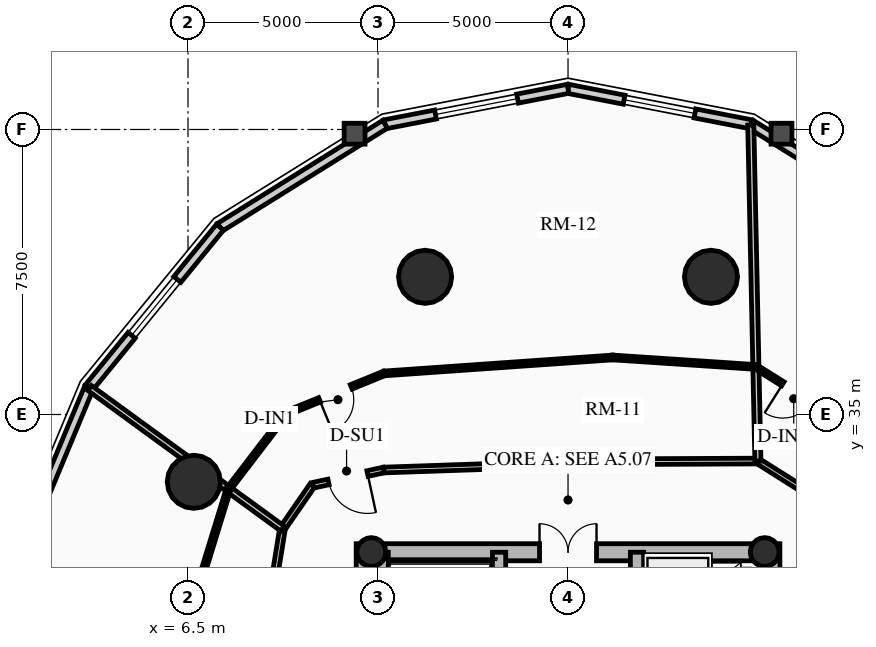
"""IFC4 building model, lengths in metres.
Left out: names, types, materials, properties, quantities, classifications, styles, units other than length and angle.
Written with IfcOpenShell. Run it as: python <this file> out.ifc"""

import sys

from ifc_helpers import new_model, si_unit, direction, frame, frame_2d, origin, origin_2d, place, context, subcontext, project, spatial, rectangle, circle, hollow_circle, extrude, source, transform, mapped, element, fill, save


model = new_model("IFC4")
c1 = context("Model", 3, precision=1e-05, world=origin(), true_north=direction((0.0, 1.0)))
c2 = subcontext(c1, "Body", "Model", "MODEL_VIEW")
j1 = project(units=[si_unit("LENGTHUNIT", "METRE"), si_unit("PLANEANGLEUNIT", "RADIAN")], contexts=[c1])
p1 = place(None, origin())
s1 = spatial("IfcSite", under=j1, at=p1, CompositionType="ELEMENT")
p2 = place(p1, origin())
s2 = spatial("IfcBuilding", under=s1, at=p2, CompositionType="ELEMENT")
p3 = place(p2, frame((0.0, 0.0, 90.52)))
s3 = spatial("IfcBuildingStorey", under=s2, at=p3, CompositionType="ELEMENT", Elevation=90.52)
for number, where, z_axis, x_axis in (
    (1, (11.15, 17.4, 0.0), (0.0, 0.0, 1.0), (0.0, 1.0, 0.0)),
    (2, (21.85, 17.4, 0.0), (0.0, 0.0, 1.0), (0.0, 1.0, 0.0)),
):
    element("IfcWall", number, at=place(p3, frame(where, z_axis=z_axis, x_axis=x_axis)), inside=s3, PredefinedType="SHEAR", context=c2, shape_type="SweptSolid", body=[
        extrude(rectangle(XDim=14.2, YDim=0.45, at=frame_2d((7.1, 0.0))), origin(), (0.0, 0.0, 1.0), 2.91),
    ])
p4 = place(p3, frame((11.15, 31.375, 0.0), z_axis=(0.0, 0.0, 1.0), x_axis=(1.0, 0.0, 0.0)))
e3 = element("IfcWall", 3, at=p4, inside=s3, PredefinedType="SHEAR", context=c2, shape_type="SweptSolid", body=[
    extrude(rectangle(XDim=10.7, YDim=0.45, at=frame_2d((5.35, 0.0))), origin(), (0.0, 0.0, 1.0), 2.91),
])
m1 = source(origin(), c2, "Body", "SweptSolid", [
    extrude(rectangle(XDim=1.5, YDim=2.02, at=frame_2d((0.75, 1.01))), frame((0.0, 0.235, 0.0), z_axis=(0.0, -1.0, 0.0), x_axis=(1.0, 0.0, 0.0)), (0.0, 0.0, 1.0), 0.47),
])
p5 = place(p4, frame((4.6, 0.0, 0.0)))
e4 = element("IfcOpeningElement", 4, at=p5, cuts=e3, PredefinedType="OPENING", context=c2, shape_type="MappedRepresentation", body=[
    mapped(m1, transform((0.0, 0.0, 0.0), x_axis=(1.0, 0.0, 0.0), y_axis=(0.0, 1.0, 0.0), z_axis=(0.0, 0.0, 1.0), scale=1.0)),
])
p6 = place(p3, frame((14.685, 17.625, 0.0), z_axis=(0.0, 0.0, 1.0), x_axis=(0.0, 1.0, 0.0)))
e5 = element("IfcWall", 5, at=p6, inside=s3, PredefinedType="SHEAR", context=c2, shape_type="SweptSolid", body=[
    extrude(rectangle(XDim=13.75, YDim=0.35, at=frame_2d((6.875, 0.0))), origin(), (0.0, 0.0, 1.0), 2.91),
])
m2 = source(origin(), c2, "Body", "SweptSolid", [
    extrude(rectangle(XDim=1.1, YDim=2.015, at=frame_2d((0.55, 1.007))), frame((0.0, 0.185, 0.0), z_axis=(0.0, -1.0, 0.0), x_axis=(1.0, 0.0, 0.0)), (0.0, 0.0, 1.0), 0.37),
])
p7 = place(p6, frame((4.875, 0.0, 0.0)))
e6 = element("IfcOpeningElement", 6, at=p7, cuts=e5, PredefinedType="OPENING", context=c2, shape_type="MappedRepresentation", body=[
    mapped(m2, transform((0.0, 0.0, 0.0), x_axis=(1.0, 0.0, 0.0), y_axis=(0.0, 1.0, 0.0), z_axis=(0.0, 0.0, 1.0), scale=1.0)),
])
m3 = source(origin(), c2, "Body", "SweptSolid", [
    extrude(rectangle(XDim=1.15, YDim=2.02, at=frame_2d((0.575, 1.01))), frame((0.0, 0.185, 0.0), z_axis=(0.0, -1.0, 0.0), x_axis=(1.0, 0.0, 0.0)), (0.0, 0.0, 1.0), 0.37),
])
p8 = place(p6, frame((7.295, 0.0, 0.0)))
e7 = element("IfcOpeningElement", 7, at=p8, cuts=e5, PredefinedType="OPENING", context=c2, shape_type="MappedRepresentation", body=[
    mapped(m3, transform((0.0, 0.0, 0.0), x_axis=(1.0, 0.0, 0.0), y_axis=(0.0, 1.0, 0.0), z_axis=(0.0, 0.0, 1.0), scale=1.0)),
])
p9 = place(p3, frame((18.315, 17.625, 0.0), z_axis=(0.0, 0.0, 1.0), x_axis=(0.0, 1.0, 0.0)))
e8 = element("IfcWall", 8, at=p9, inside=s3, PredefinedType="SHEAR", context=c2, shape_type="SweptSolid", body=[
    extrude(rectangle(XDim=13.75, YDim=0.35, at=frame_2d((6.875, 0.0))), origin(), (0.0, 0.0, 1.0), 2.91),
])
p10 = place(p9, frame((10.0, 0.0, 0.0)))
e9 = element("IfcOpeningElement", 9, at=p10, cuts=e8, PredefinedType="OPENING", context=c2, shape_type="MappedRepresentation", body=[
    mapped(m2, transform((0.0, 0.0, 0.0), x_axis=(1.0, 0.0, 0.0), y_axis=(0.0, 1.0, 0.0), z_axis=(0.0, 0.0, 1.0), scale=1.0)),
])
p11 = place(p9, frame((12.0, 0.0, 0.0)))
e10 = element("IfcOpeningElement", 10, at=p11, cuts=e8, PredefinedType="OPENING", context=c2, shape_type="MappedRepresentation", body=[
    mapped(m2, transform((0.0, 0.0, 0.0), x_axis=(1.0, 0.0, 0.0), y_axis=(0.0, 1.0, 0.0), z_axis=(0.0, 0.0, 1.0), scale=1.0)),
])
p12 = place(p9, frame((5.305, 0.0, 0.0)))
e11 = element("IfcOpeningElement", 11, at=p12, cuts=e8, PredefinedType="OPENING", context=c2, shape_type="MappedRepresentation", body=[
    mapped(m3, transform((0.0, 0.0, 0.0), x_axis=(1.0, 0.0, 0.0), y_axis=(0.0, 1.0, 0.0), z_axis=(0.0, 0.0, 1.0), scale=1.0)),
])
p13 = place(p3, frame((11.595, 24.655, 0.0), z_axis=(0.0, 0.0, 1.0), x_axis=(0.0, 1.0, 0.0)))
e12 = element("IfcWall", 12, at=p13, inside=s3, PredefinedType="SHEAR", context=c2, shape_type="SweptSolid", body=[
    extrude(rectangle(XDim=6.72, YDim=0.35, at=frame_2d((3.36, 0.0))), origin(), (0.0, 0.0, 1.0), 2.91),
])
for number, where, z_axis, x_axis in (
    (13, (11.325, 31.38, 0.0), (0.0, 0.0, 1.0), (1.0, 0.0, 0.0)),
    (14, (21.675, 31.38, 0.0), (0.0, 0.0, 1.0), (1.0, 0.0, 0.0)),
):
    element("IfcColumn", number, at=place(p3, frame(where, z_axis=z_axis, x_axis=x_axis)), inside=s3, PredefinedType="COLUMN", context=c2, shape_type="SweptSolid", body=[
        extrude(hollow_circle(Radius=0.38, WallThickness=0.032, at=origin_2d()), origin(), (0.0, 0.0, 1.0), 2.91),
    ])
for number, where, z_axis, x_axis in (
    (15, (20.261, 38.623, 0.0), (0.0, 0.0, 1.0), (1.0, 0.0, 0.0)),
    (16, (12.739, 38.623, 0.0), (0.0, 0.0, 1.0), (1.0, 0.0, 0.0)),
    (17, (6.653, 33.229, 0.0), (0.0, 0.0, 1.0), (1.0, 0.0, 0.0)),
):
    element("IfcColumn", number, at=place(p3, frame(where, z_axis=z_axis, x_axis=x_axis)), inside=s3, PredefinedType="USERDEFINED", context=c2, shape_type="SweptSolid", body=[
        extrude(circle(Radius=0.7, at=origin_2d()), origin(), (0.0, 0.0, 1.0), 2.91),
    ])
p14 = place(p3, frame((21.315, 42.637, 0.0), z_axis=(0.0, 0.0, 1.0), x_axis=(0.848520380187, -0.529162701263, 0.0)))
e18 = element("IfcWall", 18, at=p14, inside=s3, PredefinedType="SOLIDWALL", context=c2, shape_type="SweptSolid", body=[
    extrude(rectangle(XDim=5.119, YDim=0.24, at=frame_2d((2.56, 0.0))), origin(), (0.0, 0.0, 1.0), 2.179),
])
p15 = place(p3, frame((16.5, 43.57, 0.0), z_axis=(0.0, 0.0, 1.0), x_axis=(0.981723785992, -0.190311344954, 0.0)))
e19 = element("IfcWall", 19, at=p15, inside=s3, PredefinedType="SOLIDWALL", context=c2, shape_type="SweptSolid", body=[
    extrude(rectangle(XDim=4.904, YDim=0.24, at=frame_2d((2.452, 0.0))), origin(), (0.0, 0.0, 1.0), 2.179),
])
m4 = source(origin(), c2, "Body", "SweptSolid", [
    extrude(rectangle(XDim=1.9, YDim=1.35, at=frame_2d((0.95, 0.675))), frame((0.0, 0.13, 0.0), z_axis=(0.0, -1.0, 0.0), x_axis=(1.0, 0.0, 0.0)), (0.0, 0.0, 1.0), 0.26),
])
p16 = place(p15, frame((1.502, 0.0, 0.65)))
e20 = element("IfcOpeningElement", 20, at=p16, cuts=e19, PredefinedType="OPENING", context=c2, shape_type="MappedRepresentation", body=[
    mapped(m4, transform((0.0, 0.0, 0.0), x_axis=(1.0, 0.0, 0.0), y_axis=(0.0, 1.0, 0.0), z_axis=(0.0, 0.0, 1.0), scale=1.0)),
])
p17 = place(p3, frame((11.685, 42.637, 0.0), z_axis=(0.0, 0.0, 1.0), x_axis=(0.981723785992, 0.190311344954, 0.0)))
e21 = element("IfcWall", 21, at=p17, inside=s3, PredefinedType="SOLIDWALL", context=c2, shape_type="SweptSolid", body=[
    extrude(rectangle(XDim=4.904, YDim=0.24, at=frame_2d((2.452, 0.0))), origin(), (0.0, 0.0, 1.0), 2.179),
])
m5 = source(origin(), c2, "Body", "SweptSolid", [
    extrude(rectangle(XDim=2.2, YDim=1.35, at=frame_2d((1.1, 0.675))), frame((0.0, 0.13, 0.0), z_axis=(0.0, -1.0, 0.0), x_axis=(1.0, 0.0, 0.0)), (0.0, 0.0, 1.0), 0.26),
])
p18 = place(p17, frame((1.352, 0.0, 0.65)))
e22 = element("IfcOpeningElement", 22, at=p18, cuts=e21, PredefinedType="OPENING", context=c2, shape_type="MappedRepresentation", body=[
    mapped(m5, transform((0.0, 0.0, 0.0), x_axis=(1.0, 0.0, 0.0), y_axis=(0.0, 1.0, 0.0), z_axis=(0.0, 0.0, 1.0), scale=1.0)),
])
p19 = place(p3, frame((7.342, 39.928, 0.0), z_axis=(0.0, 0.0, 1.0), x_axis=(0.848520380187, 0.529162701263, 0.0)))
e23 = element("IfcWall", 23, at=p19, inside=s3, PredefinedType="SOLIDWALL", context=c2, shape_type="SweptSolid", body=[
    extrude(rectangle(XDim=5.119, YDim=0.24, at=frame_2d((2.56, 0.0))), origin(), (0.0, 0.0, 1.0), 2.179),
])
p20 = place(p3, frame((3.895, 35.709, 0.0), z_axis=(0.0, 0.0, 1.0), x_axis=(0.632700781152, 0.77439635945, 0.0)))
e24 = element("IfcWall", 24, at=p20, inside=s3, PredefinedType="SOLIDWALL", context=c2, shape_type="SweptSolid", body=[
    extrude(rectangle(XDim=5.448, YDim=0.24, at=frame_2d((2.724, 0.0))), origin(), (0.0, 0.0, 1.0), 2.179),
])
p21 = place(p20, frame((1.774, 0.0, 0.65)))
e25 = element("IfcOpeningElement", 25, at=p21, cuts=e24, PredefinedType="OPENING", context=c2, shape_type="MappedRepresentation", body=[
    mapped(m4, transform((0.0, 0.0, 0.0), x_axis=(1.0, 0.0, 0.0), y_axis=(0.0, 1.0, 0.0), z_axis=(0.0, 0.0, 1.0), scale=1.0)),
])
p22 = place(p3, frame((1.682, 30.393, 0.0), z_axis=(0.0, 0.0, 1.0), x_axis=(0.384344417632, 0.923189779317, 0.0)))
e26 = element("IfcWall", 26, at=p22, inside=s3, PredefinedType="SOLIDWALL", context=c2, shape_type="SweptSolid", body=[
    extrude(rectangle(XDim=5.758, YDim=0.24, at=frame_2d((2.879, 0.0))), origin(), (0.0, 0.0, 1.0), 2.179),
])
p23 = place(p3, frame((22.837, 32.929, 0.0), z_axis=(0.0, 0.0, 1.0), x_axis=(-0.84581079329, 0.533482991252, 0.0)))
e27 = element("IfcWall", 27, at=p23, inside=s3, PredefinedType="PARTITIONING", context=c2, shape_type="SweptSolid", body=[
    extrude(rectangle(XDim=1.585, YDim=0.15, at=frame_2d((0.792, 0.0))), origin(), (0.0, 0.0, 1.0), 2.225),
])
p24 = place(p3, frame((21.496, 33.775, 0.0), z_axis=(0.0, 0.0, 1.0), x_axis=(-0.999989544737, -0.004572790979, 0.0)))
e28 = element("IfcWall", 28, at=p24, inside=s3, PredefinedType="PARTITIONING", context=c2, shape_type="SweptSolid", body=[
    extrude(rectangle(XDim=3.364, YDim=0.15, at=frame_2d((1.682, 0.0))), origin(), (0.0, 0.0, 1.0), 2.225),
])
p25 = place(p3, frame((18.133, 33.76, 0.0), z_axis=(0.0, 0.0, 1.0), x_axis=(-0.999419643988, -0.034064280574, 0.0)))
e29 = element("IfcWall", 29, at=p25, inside=s3, PredefinedType="PARTITIONING", context=c2, shape_type="SweptSolid", body=[
    extrude(rectangle(XDim=6.486, YDim=0.15, at=frame_2d((3.243, 0.0))), origin(), (0.0, 0.0, 1.0), 2.225),
])
p26 = place(p3, frame((11.65, 33.539, 0.0), z_axis=(0.0, 0.0, 1.0), x_axis=(-0.977535921581, -0.210768882949, 0.0)))
e30 = element("IfcWall", 30, at=p26, inside=s3, PredefinedType="PARTITIONING", context=c2, shape_type="SweptSolid", body=[
    extrude(rectangle(XDim=1.923, YDim=0.15, at=frame_2d((0.961, 0.0))), origin(), (0.0, 0.0, 1.0), 2.225),
])
m6 = source(origin(), c2, "Body", "SweptSolid", [
    extrude(rectangle(XDim=1.05, YDim=2.015, at=frame_2d((0.525, 1.007))), frame((0.0, 0.085, 0.0), z_axis=(0.0, -1.0, 0.0), x_axis=(1.0, 0.0, 0.0)), (0.0, 0.0, 1.0), 0.17),
])
p27 = place(p26, frame((0.436, 0.0, 0.0)))
e31 = element("IfcOpeningElement", 31, at=p27, cuts=e30, PredefinedType="OPENING", context=c2, shape_type="MappedRepresentation", body=[
    mapped(m6, transform((0.0, 0.0, 0.0), x_axis=(1.0, 0.0, 0.0), y_axis=(0.0, 1.0, 0.0), z_axis=(0.0, 0.0, 1.0), scale=1.0)),
])
p28 = place(p3, frame((9.771, 33.133, 0.0), z_axis=(0.0, 0.0, 1.0), x_axis=(-0.568464531016, -0.822707771312, 0.0)))
e32 = element("IfcWall", 32, at=p28, inside=s3, PredefinedType="PARTITIONING", context=c2, shape_type="SweptSolid", body=[
    extrude(rectangle(XDim=1.38, YDim=0.15, at=frame_2d((0.69, 0.0))), origin(), (0.0, 0.0, 1.0), 2.225),
])
p29 = place(p3, frame((8.986, 31.998, 0.0), z_axis=(0.0, 0.0, 1.0), x_axis=(-0.158992972351, -0.98727971454, 0.0)))
e33 = element("IfcWall", 33, at=p29, inside=s3, PredefinedType="PARTITIONING", context=c2, shape_type="SweptSolid", body=[
    extrude(rectangle(XDim=1.539, YDim=0.15, at=frame_2d((0.769, 0.0))), origin(), (0.0, 0.0, 1.0), 2.225),
])
p30 = place(p3, frame((21.496, 33.775, 0.0), z_axis=(0.0, 0.0, 1.0), x_axis=(-0.021226580265, 0.999774690763, 0.0)))
e34 = element("IfcWall", 34, at=p30, inside=s3, PredefinedType="PARTITIONING", context=c2, shape_type="SweptSolid", body=[
    extrude(rectangle(XDim=8.845, YDim=0.16, at=frame_2d((4.422, 0.0))), origin(), (0.0, 0.0, 1.0), 2.179),
])
p31 = place(p3, frame((8.986, 31.998, 0.0), z_axis=(0.0, 0.0, 1.0), x_axis=(-0.808130498411, 0.589003478375, 0.0)))
e35 = element("IfcWall", 35, at=p31, inside=s3, PredefinedType="PARTITIONING", context=c2, shape_type="SweptSolid", body=[
    extrude(rectangle(XDim=6.281, YDim=0.16, at=frame_2d((3.14, 0.0))), origin(), (0.0, 0.0, 1.0), 2.179),
])
p32 = place(p3, frame((23.624, 34.884, 0.0), z_axis=(0.0, 0.0, 1.0), x_axis=(-0.84728326465, 0.531141289531, 0.0)))
e36 = element("IfcWall", 36, at=p32, inside=s3, PredefinedType="PARTITIONING", context=c2, shape_type="SweptSolid", body=[
    extrude(rectangle(XDim=2.573, YDim=0.125, at=frame_2d((1.287, 0.0))), origin(), (0.0, 0.0, 1.0), 2.225),
])
m7 = source(origin(), c2, "Body", "SweptSolid", [
    extrude(rectangle(XDim=0.9, YDim=2.005, at=frame_2d((0.45, 1.002))), frame((0.0, 0.073, 0.0), z_axis=(0.0, -1.0, 0.0), x_axis=(1.0, 0.0, 0.0)), (0.0, 0.0, 1.0), 0.145),
])
p33 = place(p32, frame((0.836, 0.0, 0.0)))
e37 = element("IfcOpeningElement", 37, at=p33, cuts=e36, PredefinedType="OPENING", context=c2, shape_type="MappedRepresentation", body=[
    mapped(m7, transform((0.0, 0.0, 0.0), x_axis=(1.0, 0.0, 0.0), y_axis=(0.0, 1.0, 0.0), z_axis=(0.0, 0.0, 1.0), scale=1.0)),
])
p34 = place(p3, frame((21.444, 36.251, 0.0), z_axis=(0.0, 0.0, 1.0), x_axis=(-0.997810544349, 0.066137112017, 0.0)))
e38 = element("IfcWall", 38, at=p34, inside=s3, PredefinedType="PARTITIONING", context=c2, shape_type="SweptSolid", body=[
    extrude(rectangle(XDim=3.776, YDim=0.125, at=frame_2d((1.888, 0.0))), origin(), (0.0, 0.0, 1.0), 2.225),
])
p35 = place(p3, frame((17.676, 36.501, 0.0), z_axis=(0.0, 0.0, 1.0), x_axis=(-0.997570913993, -0.069658248298, 0.0)))
e39 = element("IfcWall", 39, at=p35, inside=s3, PredefinedType="PARTITIONING", context=c2, shape_type="SweptSolid", body=[
    extrude(rectangle(XDim=6.028, YDim=0.125, at=frame_2d((3.014, 0.0))), origin(), (0.0, 0.0, 1.0), 2.225),
])
p36 = place(p3, frame((11.662, 36.081, 0.0), z_axis=(0.0, 0.0, 1.0), x_axis=(-0.925664670378, -0.378344972234, 0.0)))
e40 = element("IfcWall", 40, at=p36, inside=s3, PredefinedType="PARTITIONING", context=c2, shape_type="SweptSolid", body=[
    extrude(rectangle(XDim=2.774, YDim=0.125, at=frame_2d((1.387, 0.0))), origin(), (0.0, 0.0, 1.0), 2.225),
])
p37 = place(p36, frame((0.937, 0.0, 0.0)))
e41 = element("IfcOpeningElement", 41, at=p37, cuts=e40, PredefinedType="OPENING", context=c2, shape_type="MappedRepresentation", body=[
    mapped(m7, transform((0.0, 0.0, 0.0), x_axis=(1.0, 0.0, 0.0), y_axis=(0.0, 1.0, 0.0), z_axis=(0.0, 0.0, 1.0), scale=1.0)),
])
p38 = place(p3, frame((9.094, 35.031, 0.0), z_axis=(0.0, 0.0, 1.0), x_axis=(-0.607813927368, -0.794079485755, 0.0)))
e42 = element("IfcWall", 42, at=p38, inside=s3, PredefinedType="PARTITIONING", context=c2, shape_type="SweptSolid", body=[
    extrude(rectangle(XDim=2.515, YDim=0.125, at=frame_2d((1.258, 0.0))), origin(), (0.0, 0.0, 1.0), 2.655),
])
p39 = place(p3, frame((7.565, 33.034, 0.0), z_axis=(0.0, 0.0, 1.0), x_axis=(-0.294365365095, -0.955692958974, 0.0)))
e43 = element("IfcWall", 43, at=p39, inside=s3, PredefinedType="PARTITIONING", context=c2, shape_type="SweptSolid", body=[
    extrude(rectangle(XDim=2.7, YDim=0.125, at=frame_2d((1.35, 0.0))), origin(), (0.0, 0.0, 1.0), 2.225),
])
m8 = source(origin(), c2, "Body", "SweptSolid", [
    extrude(rectangle(XDim=1.9, YDim=1.35, at=frame_2d((0.95, 0.675))), frame((0.0, 0.03, 0.0), z_axis=(0.0, -1.0, 0.0), x_axis=(1.0, 0.0, 0.0)), (0.0, 0.0, 1.0), 0.06),
])
p40 = place(p16, origin())
e44 = element("IfcWindow", 44, at=p40, inside=s3, PartitioningType="DOUBLE_PANEL_VERTICAL", PredefinedType="WINDOW", context=c2, shape_type="MappedRepresentation", body=[
    mapped(m8, transform((0.0, 0.0, 0.0), x_axis=(1.0, 0.0, 0.0), y_axis=(0.0, 1.0, 0.0), z_axis=(0.0, 0.0, 1.0), scale=1.0)),
])
fill(e20, e44)
m9 = source(origin(), c2, "Body", "SweptSolid", [
    extrude(rectangle(XDim=2.2, YDim=1.35, at=frame_2d((1.1, 0.675))), frame((0.0, 0.03, 0.0), z_axis=(0.0, -1.0, 0.0), x_axis=(1.0, 0.0, 0.0)), (0.0, 0.0, 1.0), 0.06),
])
p41 = place(p18, origin())
e45 = element("IfcWindow", 45, at=p41, inside=s3, PartitioningType="DOUBLE_PANEL_VERTICAL", PredefinedType="WINDOW", context=c2, shape_type="MappedRepresentation", body=[
    mapped(m9, transform((0.0, 0.0, 0.0), x_axis=(1.0, 0.0, 0.0), y_axis=(0.0, 1.0, 0.0), z_axis=(0.0, 0.0, 1.0), scale=1.0)),
])
fill(e22, e45)
p42 = place(p21, origin())
e46 = element("IfcWindow", 46, at=p42, inside=s3, PartitioningType="DOUBLE_PANEL_VERTICAL", PredefinedType="WINDOW", context=c2, shape_type="MappedRepresentation", body=[
    mapped(m8, transform((0.0, 0.0, 0.0), x_axis=(1.0, 0.0, 0.0), y_axis=(0.0, 1.0, 0.0), z_axis=(0.0, 0.0, 1.0), scale=1.0)),
])
fill(e25, e46)
m10 = source(origin(), c2, "Body", "SweptSolid", [
    extrude(rectangle(XDim=1.5, YDim=2.02, at=frame_2d((0.75, 1.01))), frame((0.0, 0.025, 0.0), z_axis=(0.0, -1.0, 0.0), x_axis=(1.0, 0.0, 0.0)), (0.0, 0.0, 1.0), 0.05),
])
p43 = place(p5, origin())
e47 = element("IfcDoor", 47, at=p43, inside=s3, OperationType="DOUBLE_DOOR_SINGLE_SWING", PredefinedType="DOOR", context=c2, shape_type="MappedRepresentation", body=[
    mapped(m10, transform((0.0, 0.0, 0.0), x_axis=(1.0, 0.0, 0.0), y_axis=(0.0, 1.0, 0.0), z_axis=(0.0, 0.0, 1.0), scale=1.0)),
])
fill(e4, e47)
m11 = source(origin(), c2, "Body", "SweptSolid", [
    extrude(rectangle(XDim=0.9, YDim=2.005, at=frame_2d((0.45, 1.002))), frame((0.0, 0.025, 0.0), z_axis=(0.0, -1.0, 0.0), x_axis=(1.0, 0.0, 0.0)), (0.0, 0.0, 1.0), 0.05),
])
p44 = place(p33, origin())
e48 = element("IfcDoor", 48, at=p44, inside=s3, OperationType="SINGLE_SWING_RIGHT", PredefinedType="DOOR", context=c2, shape_type="MappedRepresentation", body=[
    mapped(m11, transform((0.0, 0.0, 0.0), x_axis=(1.0, 0.0, 0.0), y_axis=(0.0, 1.0, 0.0), z_axis=(0.0, 0.0, 1.0), scale=1.0)),
])
fill(e37, e48)
m12 = source(origin(), c2, "Body", "SweptSolid", [
    extrude(rectangle(XDim=1.05, YDim=2.015, at=frame_2d((0.525, 1.007))), frame((0.0, 0.025, 0.0), z_axis=(0.0, -1.0, 0.0), x_axis=(1.0, 0.0, 0.0)), (0.0, 0.0, 1.0), 0.05),
])
p45 = place(p27, origin())
e49 = element("IfcDoor", 49, at=p45, inside=s3, OperationType="SINGLE_SWING_LEFT", PredefinedType="DOOR", context=c2, shape_type="MappedRepresentation", body=[
    mapped(m12, transform((0.0, 0.0, 0.0), x_axis=(1.0, 0.0, 0.0), y_axis=(0.0, 1.0, 0.0), z_axis=(0.0, 0.0, 1.0), scale=1.0)),
])
fill(e31, e49)
p46 = place(p37, origin())
e50 = element("IfcDoor", 50, at=p46, inside=s3, OperationType="SINGLE_SWING_RIGHT", PredefinedType="DOOR", context=c2, shape_type="MappedRepresentation", body=[
    mapped(m11, transform((0.0, 0.0, 0.0), x_axis=(1.0, 0.0, 0.0), y_axis=(0.0, 1.0, 0.0), z_axis=(0.0, 0.0, 1.0), scale=1.0)),
])
fill(e41, e50)
save(model, sys.argv[1])
